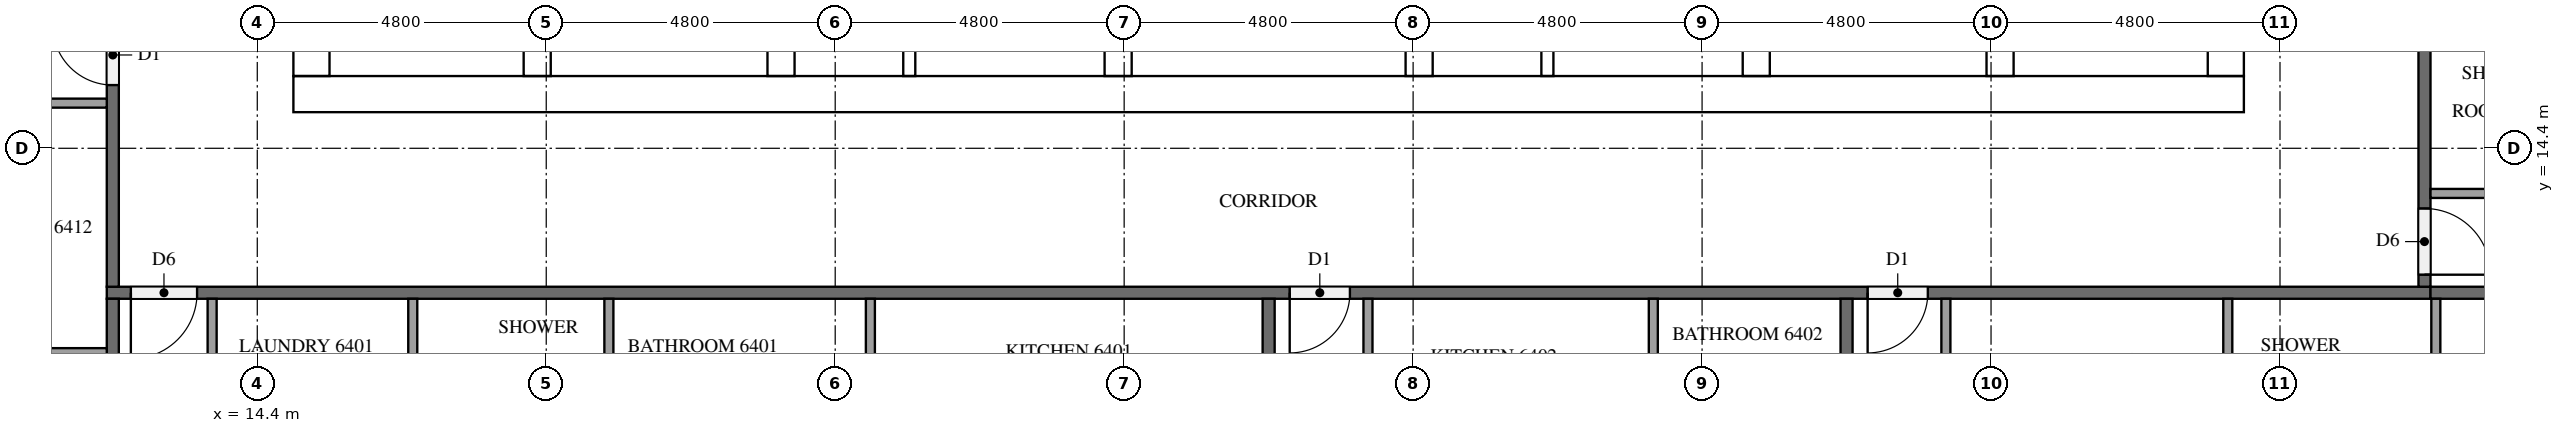
"""IFC4 building model, lengths in metres.
Left out: names, types, materials, properties, quantities, classifications, styles, units other than length and angle.
Written with IfcOpenShell. Run it as: python <this file> out.ifc"""

import sys

from ifc_helpers import new_model, si_unit, direction, frame, frame_2d, origin, place, context, subcontext, project, spatial, rectangle, extrude, element, fill, save


model = new_model("IFC4")
c1 = context("Model", 3, precision=1e-05, world=origin(), true_north=direction((0.0, 1.0)))
c2 = subcontext(c1, "Body", "Model", "MODEL_VIEW")
j1 = project(units=[si_unit("LENGTHUNIT", "METRE"), si_unit("PLANEANGLEUNIT", "RADIAN")], contexts=[c1])
p1 = place(None, origin())
s1 = spatial("IfcSite", under=j1, at=p1, CompositionType="ELEMENT")
p2 = place(p1, origin())
s2 = spatial("IfcBuilding", under=s1, at=p2, CompositionType="ELEMENT")
p3 = place(p2, frame((0.0, 0.0, 245.7)))
s3 = spatial("IfcBuildingStorey", under=s2, at=p3, CompositionType="ELEMENT", Elevation=245.7)
p4 = place(p3, frame((15.0, 15.3, 0.0), z_axis=(0.0, 0.0, 1.0), x_axis=(1.0, 0.0, 0.0)))
e1 = element("IfcWall", 1, at=p4, inside=s3, PredefinedType="SHEAR", context=c2, shape_type="SweptSolid", body=[
    extrude(rectangle(XDim=32.4, YDim=0.6, at=frame_2d((16.2, 0.0))), origin(), (0.0, 0.0, 1.0), 3.2),
])
p5 = place(p4, frame((15.3, 0.0, 0.0)))
e2 = element("IfcOpeningElement", 2, at=p5, cuts=e1, PredefinedType="OPENING", context=c2, shape_type="SweptSolid", body=[
    extrude(rectangle(XDim=1.8, YDim=2.1, at=frame_2d((0.9, 1.05))), frame((0.0, 0.31, 0.0), z_axis=(0.0, -1.0, 0.0), x_axis=(1.0, 0.0, 0.0)), (0.0, 0.0, 1.0), 0.62),
])
p6 = place(p3, frame((15.3, 15.6, 0.0), z_axis=(0.0, 0.0, 1.0), x_axis=(0.0, 1.0, 0.0)))
e3 = element("IfcWall", 3, at=p6, inside=s3, PredefinedType="SHEAR", context=c2, shape_type="SweptSolid", body=[
    extrude(rectangle(XDim=21.6, YDim=0.6, at=frame_2d((10.8, 0.0))), origin(), (0.0, 0.0, 1.0), 3.2),
])
p7 = place(p6, frame((5.16, 0.0, 0.0)))
e4 = element("IfcOpeningElement", 4, at=p7, cuts=e3, PredefinedType="OPENING", context=c2, shape_type="SweptSolid", body=[
    extrude(rectangle(XDim=1.2, YDim=2.1, at=frame_2d((0.6, 1.05))), frame((0.0, 0.31, 0.0), z_axis=(0.0, -1.0, 0.0), x_axis=(1.0, 0.0, 0.0)), (0.0, 0.0, 1.0), 0.62),
])
p8 = place(p3, frame((47.1, 15.6, 0.0), z_axis=(0.0, 0.0, 1.0), x_axis=(0.0, 1.0, 0.0)))
e5 = element("IfcWall", 5, at=p8, inside=s3, PredefinedType="SHEAR", context=c2, shape_type="SweptSolid", body=[
    extrude(rectangle(XDim=21.6, YDim=0.6, at=frame_2d((10.8, 0.0))), origin(), (0.0, 0.0, 1.0), 3.2),
])
p9 = place(p8, frame((10.5, 0.0, 0.0)))
e6 = element("IfcOpeningElement", 6, at=p9, cuts=e5, PredefinedType="OPENING", context=c2, shape_type="SweptSolid", body=[
    extrude(rectangle(XDim=1.2, YDim=2.1, at=frame_2d((0.6, 1.05))), frame((0.0, 0.31, 0.0), z_axis=(0.0, -1.0, 0.0), x_axis=(1.0, 0.0, 0.0)), (0.0, 0.0, 1.0), 0.62),
])
p10 = place(p3, frame((19.05, 15.6, 0.0), z_axis=(0.0, 0.0, 1.0), x_axis=(0.0, 1.0, 0.0)))
e7 = element("IfcWall", 7, at=p10, inside=s3, PredefinedType="SHEAR", context=c2, shape_type="SweptSolid", body=[
    extrude(rectangle(XDim=15.425, YDim=0.45, at=frame_2d((7.712, 0.0))), origin(), (0.0, 0.0, 1.0), 3.2),
])
p11 = place(p10, frame((9.85, 0.0, 0.0)))
e8 = element("IfcOpeningElement", 8, at=p11, cuts=e7, PredefinedType="OPENING", context=c2, shape_type="SweptSolid", body=[
    extrude(rectangle(XDim=1.1, YDim=2.1, at=frame_2d((0.55, 1.05))), frame((0.0, 0.235, 0.0), z_axis=(0.0, -1.0, 0.0), x_axis=(1.0, 0.0, 0.0)), (0.0, 0.0, 1.0), 0.47),
])
p12 = place(p10, frame((13.35, 0.0, 0.0)))
e9 = element("IfcOpeningElement", 9, at=p12, cuts=e7, PredefinedType="OPENING", context=c2, shape_type="SweptSolid", body=[
    extrude(rectangle(XDim=1.1, YDim=2.1, at=frame_2d((0.55, 1.05))), frame((0.0, 0.235, 0.0), z_axis=(0.0, -1.0, 0.0), x_axis=(1.0, 0.0, 0.0)), (0.0, 0.0, 1.0), 0.47),
])
p13 = place(p10, frame((0.6, 0.0, 0.0)))
e10 = element("IfcOpeningElement", 10, at=p13, cuts=e7, PredefinedType="OPENING", context=c2, shape_type="SweptSolid", body=[
    extrude(rectangle(XDim=1.2, YDim=2.1, at=frame_2d((0.6, 1.05))), frame((0.0, 0.235, 0.0), z_axis=(0.0, -1.0, 0.0), x_axis=(1.0, 0.0, 0.0)), (0.0, 0.0, 1.0), 0.47),
])
p14 = place(p3, frame((23.1, 15.6, 0.0), z_axis=(0.0, 0.0, 1.0), x_axis=(0.0, 1.0, 0.0)))
e11 = element("IfcWall", 11, at=p14, inside=s3, PredefinedType="SHEAR", context=c2, shape_type="SweptSolid", body=[
    extrude(rectangle(XDim=21.6, YDim=0.45, at=frame_2d((10.8, 0.0))), origin(), (0.0, 0.0, 1.0), 3.2),
])
p15 = place(p3, frame((39.3, 15.6, 0.0), z_axis=(0.0, 0.0, 1.0), x_axis=(0.0, 1.0, 0.0)))
e12 = element("IfcWall", 12, at=p15, inside=s3, PredefinedType="SHEAR", context=c2, shape_type="SweptSolid", body=[
    extrude(rectangle(XDim=8.65, YDim=0.45, at=frame_2d((4.325, 0.0))), origin(), (0.0, 0.0, 1.0), 3.2),
])
p16 = place(p3, frame((43.35, 15.6, 0.0), z_axis=(0.0, 0.0, 1.0), x_axis=(0.0, 1.0, 0.0)))
e13 = element("IfcWall", 13, at=p16, inside=s3, PredefinedType="SHEAR", context=c2, shape_type="SweptSolid", body=[
    extrude(rectangle(XDim=8.65, YDim=0.45, at=frame_2d((4.325, 0.0))), origin(), (0.0, 0.0, 1.0), 3.2),
])
p17 = place(p16, frame((0.6, 0.0, 0.0)))
e14 = element("IfcOpeningElement", 14, at=p17, cuts=e13, PredefinedType="OPENING", context=c2, shape_type="SweptSolid", body=[
    extrude(rectangle(XDim=1.2, YDim=2.1, at=frame_2d((0.6, 1.05))), frame((0.0, 0.235, 0.0), z_axis=(0.0, -1.0, 0.0), x_axis=(1.0, 0.0, 0.0)), (0.0, 0.0, 1.0), 0.47),
])
for number, where, z_axis, x_axis in (
    (15, (28.7, 15.6, 0.0), (0.0, 0.0, 1.0), (0.0, 1.0, 0.0)),
    (16, (33.7, 15.6, 0.0), (0.0, 0.0, 1.0), (0.0, 1.0, 0.0)),
):
    element("IfcWall", number, at=place(p3, frame(where, z_axis=z_axis, x_axis=x_axis)), inside=s3, PredefinedType="SHEAR", context=c2, shape_type="SweptSolid", body=[
        extrude(rectangle(XDim=2.925, YDim=0.45, at=frame_2d((1.462, 0.0))), origin(), (0.0, 0.0, 1.0), 3.2),
    ])
for number, where, z_axis, x_axis in (
    (17, (25.23, 15.6, 0.0), (0.0, 0.0, 1.0), (0.0, 1.0, 0.0)),
    (18, (35.831, 15.6, 0.0), (0.0, 0.0, 1.0), (0.0, 1.0, 0.0)),
):
    element("IfcWall", number, at=place(p3, frame(where, z_axis=z_axis, x_axis=x_axis)), inside=s3, PredefinedType="PARTITIONING", context=c2, shape_type="SweptSolid", body=[
        extrude(rectangle(XDim=2.925, YDim=0.2, at=frame_2d((1.462, 0.0))), origin(), (0.0, 0.0, 1.0), 3.2),
    ])
p18 = place(p3, frame((50.5, 12.0, 0.0), z_axis=(0.0, 0.0, 1.0), x_axis=(-1.0, 0.0, 0.0)))
e19 = element("IfcWall", 19, at=p18, inside=s3, PredefinedType="PARTITIONING", context=c2, shape_type="SweptSolid", body=[
    extrude(rectangle(XDim=38.6, YDim=0.2, at=frame_2d((19.3, 0.0))), origin(), (0.0, 0.0, 1.0), 3.2),
])
p19 = place(p18, frame((37.1, 0.0, 0.0)))
e20 = element("IfcOpeningElement", 20, at=p19, cuts=e19, PredefinedType="OPENING", context=c2, shape_type="SweptSolid", body=[
    extrude(rectangle(XDim=1.1, YDim=2.1, at=frame_2d((0.55, 1.05))), frame((0.0, 0.11, 0.0), z_axis=(0.0, -1.0, 0.0), x_axis=(1.0, 0.0, 0.0)), (0.0, 0.0, 1.0), 0.22),
])
p20 = place(p18, frame((17.95, 0.0, 0.0)))
e21 = element("IfcOpeningElement", 21, at=p20, cuts=e19, PredefinedType="OPENING", context=c2, shape_type="SweptSolid", body=[
    extrude(rectangle(XDim=1.0, YDim=2.1, at=frame_2d((0.5, 1.05))), frame((0.0, 0.11, 0.0), z_axis=(0.0, -1.0, 0.0), x_axis=(1.0, 0.0, 0.0)), (0.0, 0.0, 1.0), 0.22),
])
p21 = place(p18, frame((8.35, 0.0, 0.0)))
e22 = element("IfcOpeningElement", 22, at=p21, cuts=e19, PredefinedType="OPENING", context=c2, shape_type="SweptSolid", body=[
    extrude(rectangle(XDim=1.0, YDim=2.1, at=frame_2d((0.5, 1.05))), frame((0.0, 0.11, 0.0), z_axis=(0.0, -1.0, 0.0), x_axis=(1.0, 0.0, 0.0)), (0.0, 0.0, 1.0), 0.22),
])
p22 = place(p3, frame((50.4, 40.7, 0.0), z_axis=(0.0, 0.0, 1.0), x_axis=(0.0, -1.0, 0.0)))
e23 = element("IfcWall", 23, at=p22, inside=s3, PredefinedType="PARTITIONING", context=c2, shape_type="SweptSolid", body=[
    extrude(rectangle(XDim=28.6, YDim=0.2, at=frame_2d((14.3, 0.0))), origin(), (0.0, 0.0, 1.0), 3.2),
])
p23 = place(p22, frame((27.3, 0.0, 0.0)))
e24 = element("IfcOpeningElement", 24, at=p23, cuts=e23, PredefinedType="OPENING", context=c2, shape_type="SweptSolid", body=[
    extrude(rectangle(XDim=1.1, YDim=2.1, at=frame_2d((0.55, 1.05))), frame((0.0, 0.11, 0.0), z_axis=(0.0, -1.0, 0.0), x_axis=(1.0, 0.0, 0.0)), (0.0, 0.0, 1.0), 0.22),
])
p24 = place(p22, frame((0.25, 0.0, 0.0)))
e25 = element("IfcOpeningElement", 25, at=p24, cuts=e23, PredefinedType="OPENING", context=c2, shape_type="SweptSolid", body=[
    extrude(rectangle(XDim=1.0, YDim=2.1, at=frame_2d((0.5, 1.05))), frame((0.0, 0.11, 0.0), z_axis=(0.0, -1.0, 0.0), x_axis=(1.0, 0.0, 0.0)), (0.0, 0.0, 1.0), 0.22),
])
p25 = place(p3, frame((12.0, 12.1, 0.0), z_axis=(0.0, 0.0, 1.0), x_axis=(0.0, 1.0, 0.0)))
e26 = element("IfcWall", 26, at=p25, inside=s3, PredefinedType="PARTITIONING", context=c2, shape_type="SweptSolid", body=[
    extrude(rectangle(XDim=28.6, YDim=0.2, at=frame_2d((14.3, 0.0))), origin(), (0.0, 0.0, 1.0), 3.2),
])
p26 = place(p25, frame((27.35, 0.0, 0.0)))
e27 = element("IfcOpeningElement", 27, at=p26, cuts=e26, PredefinedType="OPENING", context=c2, shape_type="SweptSolid", body=[
    extrude(rectangle(XDim=1.0, YDim=2.1, at=frame_2d((0.5, 1.05))), frame((0.0, 0.11, 0.0), z_axis=(0.0, -1.0, 0.0), x_axis=(1.0, 0.0, 0.0)), (0.0, 0.0, 1.0), 0.22),
])
p27 = place(p25, frame((17.75, 0.0, 0.0)))
e28 = element("IfcOpeningElement", 28, at=p27, cuts=e26, PredefinedType="OPENING", context=c2, shape_type="SweptSolid", body=[
    extrude(rectangle(XDim=1.0, YDim=2.1, at=frame_2d((0.5, 1.05))), frame((0.0, 0.11, 0.0), z_axis=(0.0, -1.0, 0.0), x_axis=(1.0, 0.0, 0.0)), (0.0, 0.0, 1.0), 0.22),
])
p28 = place(p25, frame((3.35, 0.0, 0.0)))
e29 = element("IfcOpeningElement", 29, at=p28, cuts=e26, PredefinedType="OPENING", context=c2, shape_type="SweptSolid", body=[
    extrude(rectangle(XDim=1.0, YDim=2.1, at=frame_2d((0.5, 1.05))), frame((0.0, 0.11, 0.0), z_axis=(0.0, -1.0, 0.0), x_axis=(1.0, 0.0, 0.0)), (0.0, 0.0, 1.0), 0.22),
])
for number, where, z_axis, x_axis in (
    (30, (31.2, 11.9, 0.0), (0.0, 0.0, 1.0), (0.0, -1.0, 0.0)),
    (31, (12.0, 4.9, 0.0), (0.0, 0.0, 1.0), (0.0, 1.0, 0.0)),
    (32, (40.8, 11.9, 0.0), (0.0, 0.0, 1.0), (0.0, -1.0, 0.0)),
    (33, (50.5, 12.0, 0.0), (0.0, 0.0, 1.0), (1.0, 0.0, 0.0)),
):
    element("IfcWall", number, at=place(p3, frame(where, z_axis=z_axis, x_axis=x_axis)), inside=s3, PredefinedType="PARTITIONING", context=c2, shape_type="SweptSolid", body=[
        extrude(rectangle(XDim=7.0, YDim=0.2, at=frame_2d((3.5, 0.0))), origin(), (0.0, 0.0, 1.0), 3.2),
    ])
for number, where, z_axis, x_axis in (
    (34, (16.983, 11.9, 0.0), (0.0, 0.0, 1.0), (0.0, -1.0, 0.0)),
    (35, (20.24, 11.9, 0.0), (0.0, 0.0, 1.0), (0.0, -1.0, 0.0)),
    (36, (24.584, 11.9, 0.0), (0.0, 0.0, 1.0), (0.0, -1.0, 0.0)),
):
    element("IfcWall", number, at=place(p3, frame(where, z_axis=z_axis, x_axis=x_axis)), inside=s3, PredefinedType="PARTITIONING", context=c2, shape_type="SweptSolid", body=[
        extrude(rectangle(XDim=1.775, YDim=0.15, at=frame_2d((0.887, 0.0))), origin(), (0.0, 0.0, 1.0), 3.2),
    ])
for number, where, z_axis, x_axis in (
    (37, (13.65, 11.9, 0.0), (0.0, 0.0, 1.0), (0.0, -1.0, 0.0)),
    (38, (37.59, 11.9, 0.0), (0.0, 0.0, 1.0), (0.0, -1.0, 0.0)),
):
    element("IfcWall", number, at=place(p3, frame(where, z_axis=z_axis, x_axis=x_axis)), inside=s3, PredefinedType="PARTITIONING", context=c2, shape_type="SweptSolid", body=[
        extrude(rectangle(XDim=1.925, YDim=0.15, at=frame_2d((0.962, 0.0))), origin(), (0.0, 0.0, 1.0), 3.2),
    ])
for number, where, z_axis, x_axis in (
    (39, (32.85, 11.9, 0.0), (0.0, 0.0, 1.0), (0.0, -1.0, 0.0)),
    (40, (47.133, 11.9, 0.0), (0.0, 0.0, 1.0), (0.0, -1.0, 0.0)),
    (41, (50.588, 11.9, 0.0), (0.0, 0.0, 1.0), (0.0, -1.0, 0.0)),
):
    element("IfcWall", number, at=place(p3, frame(where, z_axis=z_axis, x_axis=x_axis)), inside=s3, PredefinedType="PARTITIONING", context=c2, shape_type="SweptSolid", body=[
        extrude(rectangle(XDim=2.075, YDim=0.15, at=frame_2d((1.038, 0.0))), origin(), (0.0, 0.0, 1.0), 3.2),
    ])
p29 = place(p3, frame((42.45, 11.9, 0.0), z_axis=(0.0, 0.0, 1.0), x_axis=(0.0, -1.0, 0.0)))
e42 = element("IfcWall", 42, at=p29, inside=s3, PredefinedType="PARTITIONING", context=c2, shape_type="SweptSolid", body=[
    extrude(rectangle(XDim=2.225, YDim=0.15, at=frame_2d((1.112, 0.0))), origin(), (0.0, 0.0, 1.0), 3.2),
])
p30 = place(p3, frame((50.5, 13.65, 0.0), z_axis=(0.0, 0.0, 1.0), x_axis=(1.0, 0.0, 0.0)))
e43 = element("IfcWall", 43, at=p30, inside=s3, PredefinedType="PARTITIONING", context=c2, shape_type="SweptSolid", body=[
    extrude(rectangle(XDim=2.525, YDim=0.15, at=frame_2d((1.262, 0.0))), origin(), (0.0, 0.0, 1.0), 3.2),
])
p31 = place(p3, frame((11.9, 11.005, 0.0), z_axis=(0.0, 0.0, 1.0), x_axis=(-1.0, 0.0, 0.0)))
e44 = element("IfcWall", 44, at=p31, inside=s3, PredefinedType="PARTITIONING", context=c2, shape_type="SweptSolid", body=[
    extrude(rectangle(XDim=2.975, YDim=0.15, at=frame_2d((1.487, 0.0))), origin(), (0.0, 0.0, 1.0), 3.2),
])
p32 = place(p3, frame((11.9, 15.15, 0.0), z_axis=(0.0, 0.0, 1.0), x_axis=(-1.0, 0.0, 0.0)))
e45 = element("IfcWall", 45, at=p32, inside=s3, PredefinedType="PARTITIONING", context=c2, shape_type="SweptSolid", body=[
    extrude(rectangle(XDim=3.125, YDim=0.15, at=frame_2d((1.562, 0.0))), origin(), (0.0, 0.0, 1.0), 3.2),
])
p33 = place(p5, frame((1.8, 0.0, 0.0), z_axis=(0.0, 0.0, 1.0), x_axis=(-1.0, 0.0, 0.0)))
e46 = element("IfcDoor", 46, at=p33, inside=s3, OperationType="DOUBLE_DOOR_SINGLE_SWING", PredefinedType="DOOR", context=c2, shape_type="SweptSolid", body=[
    extrude(rectangle(XDim=1.8, YDim=2.1, at=frame_2d((0.9, 1.05))), frame((0.0, 0.025, 0.0), z_axis=(0.0, -1.0, 0.0), x_axis=(1.0, 0.0, 0.0)), (0.0, 0.0, 1.0), 0.05),
])
fill(e2, e46)
p34 = place(p19, origin())
e47 = element("IfcDoor", 47, at=p34, inside=s3, OperationType="SINGLE_SWING_RIGHT", PredefinedType="DOOR", context=c2, shape_type="SweptSolid", body=[
    extrude(rectangle(XDim=1.1, YDim=2.1, at=frame_2d((0.55, 1.05))), frame((0.0, 0.025, 0.0), z_axis=(0.0, -1.0, 0.0), x_axis=(1.0, 0.0, 0.0)), (0.0, 0.0, 1.0), 0.05),
])
fill(e20, e47)
p35 = place(p20, origin())
e48 = element("IfcDoor", 48, at=p35, inside=s3, OperationType="SINGLE_SWING_RIGHT", PredefinedType="DOOR", context=c2, shape_type="SweptSolid", body=[
    extrude(rectangle(XDim=1.0, YDim=2.1, at=frame_2d((0.5, 1.05))), frame((0.0, 0.025, 0.0), z_axis=(0.0, -1.0, 0.0), x_axis=(1.0, 0.0, 0.0)), (0.0, 0.0, 1.0), 0.05),
])
fill(e21, e48)
p36 = place(p21, origin())
e49 = element("IfcDoor", 49, at=p36, inside=s3, OperationType="SINGLE_SWING_RIGHT", PredefinedType="DOOR", context=c2, shape_type="SweptSolid", body=[
    extrude(rectangle(XDim=1.0, YDim=2.1, at=frame_2d((0.5, 1.05))), frame((0.0, 0.025, 0.0), z_axis=(0.0, -1.0, 0.0), x_axis=(1.0, 0.0, 0.0)), (0.0, 0.0, 1.0), 0.05),
])
fill(e22, e49)
p37 = place(p23, origin())
e50 = element("IfcDoor", 50, at=p37, inside=s3, OperationType="SINGLE_SWING_RIGHT", PredefinedType="DOOR", context=c2, shape_type="SweptSolid", body=[
    extrude(rectangle(XDim=1.1, YDim=2.1, at=frame_2d((0.55, 1.05))), frame((0.0, 0.025, 0.0), z_axis=(0.0, -1.0, 0.0), x_axis=(1.0, 0.0, 0.0)), (0.0, 0.0, 1.0), 0.05),
])
fill(e24, e50)
p38 = place(p28, origin())
e51 = element("IfcDoor", 51, at=p38, inside=s3, OperationType="SINGLE_SWING_RIGHT", PredefinedType="DOOR", context=c2, shape_type="SweptSolid", body=[
    extrude(rectangle(XDim=1.0, YDim=2.1, at=frame_2d((0.5, 1.05))), frame((0.0, 0.025, 0.0), z_axis=(0.0, -1.0, 0.0), x_axis=(1.0, 0.0, 0.0)), (0.0, 0.0, 1.0), 0.05),
])
fill(e29, e51)
save(model, sys.argv[1])
